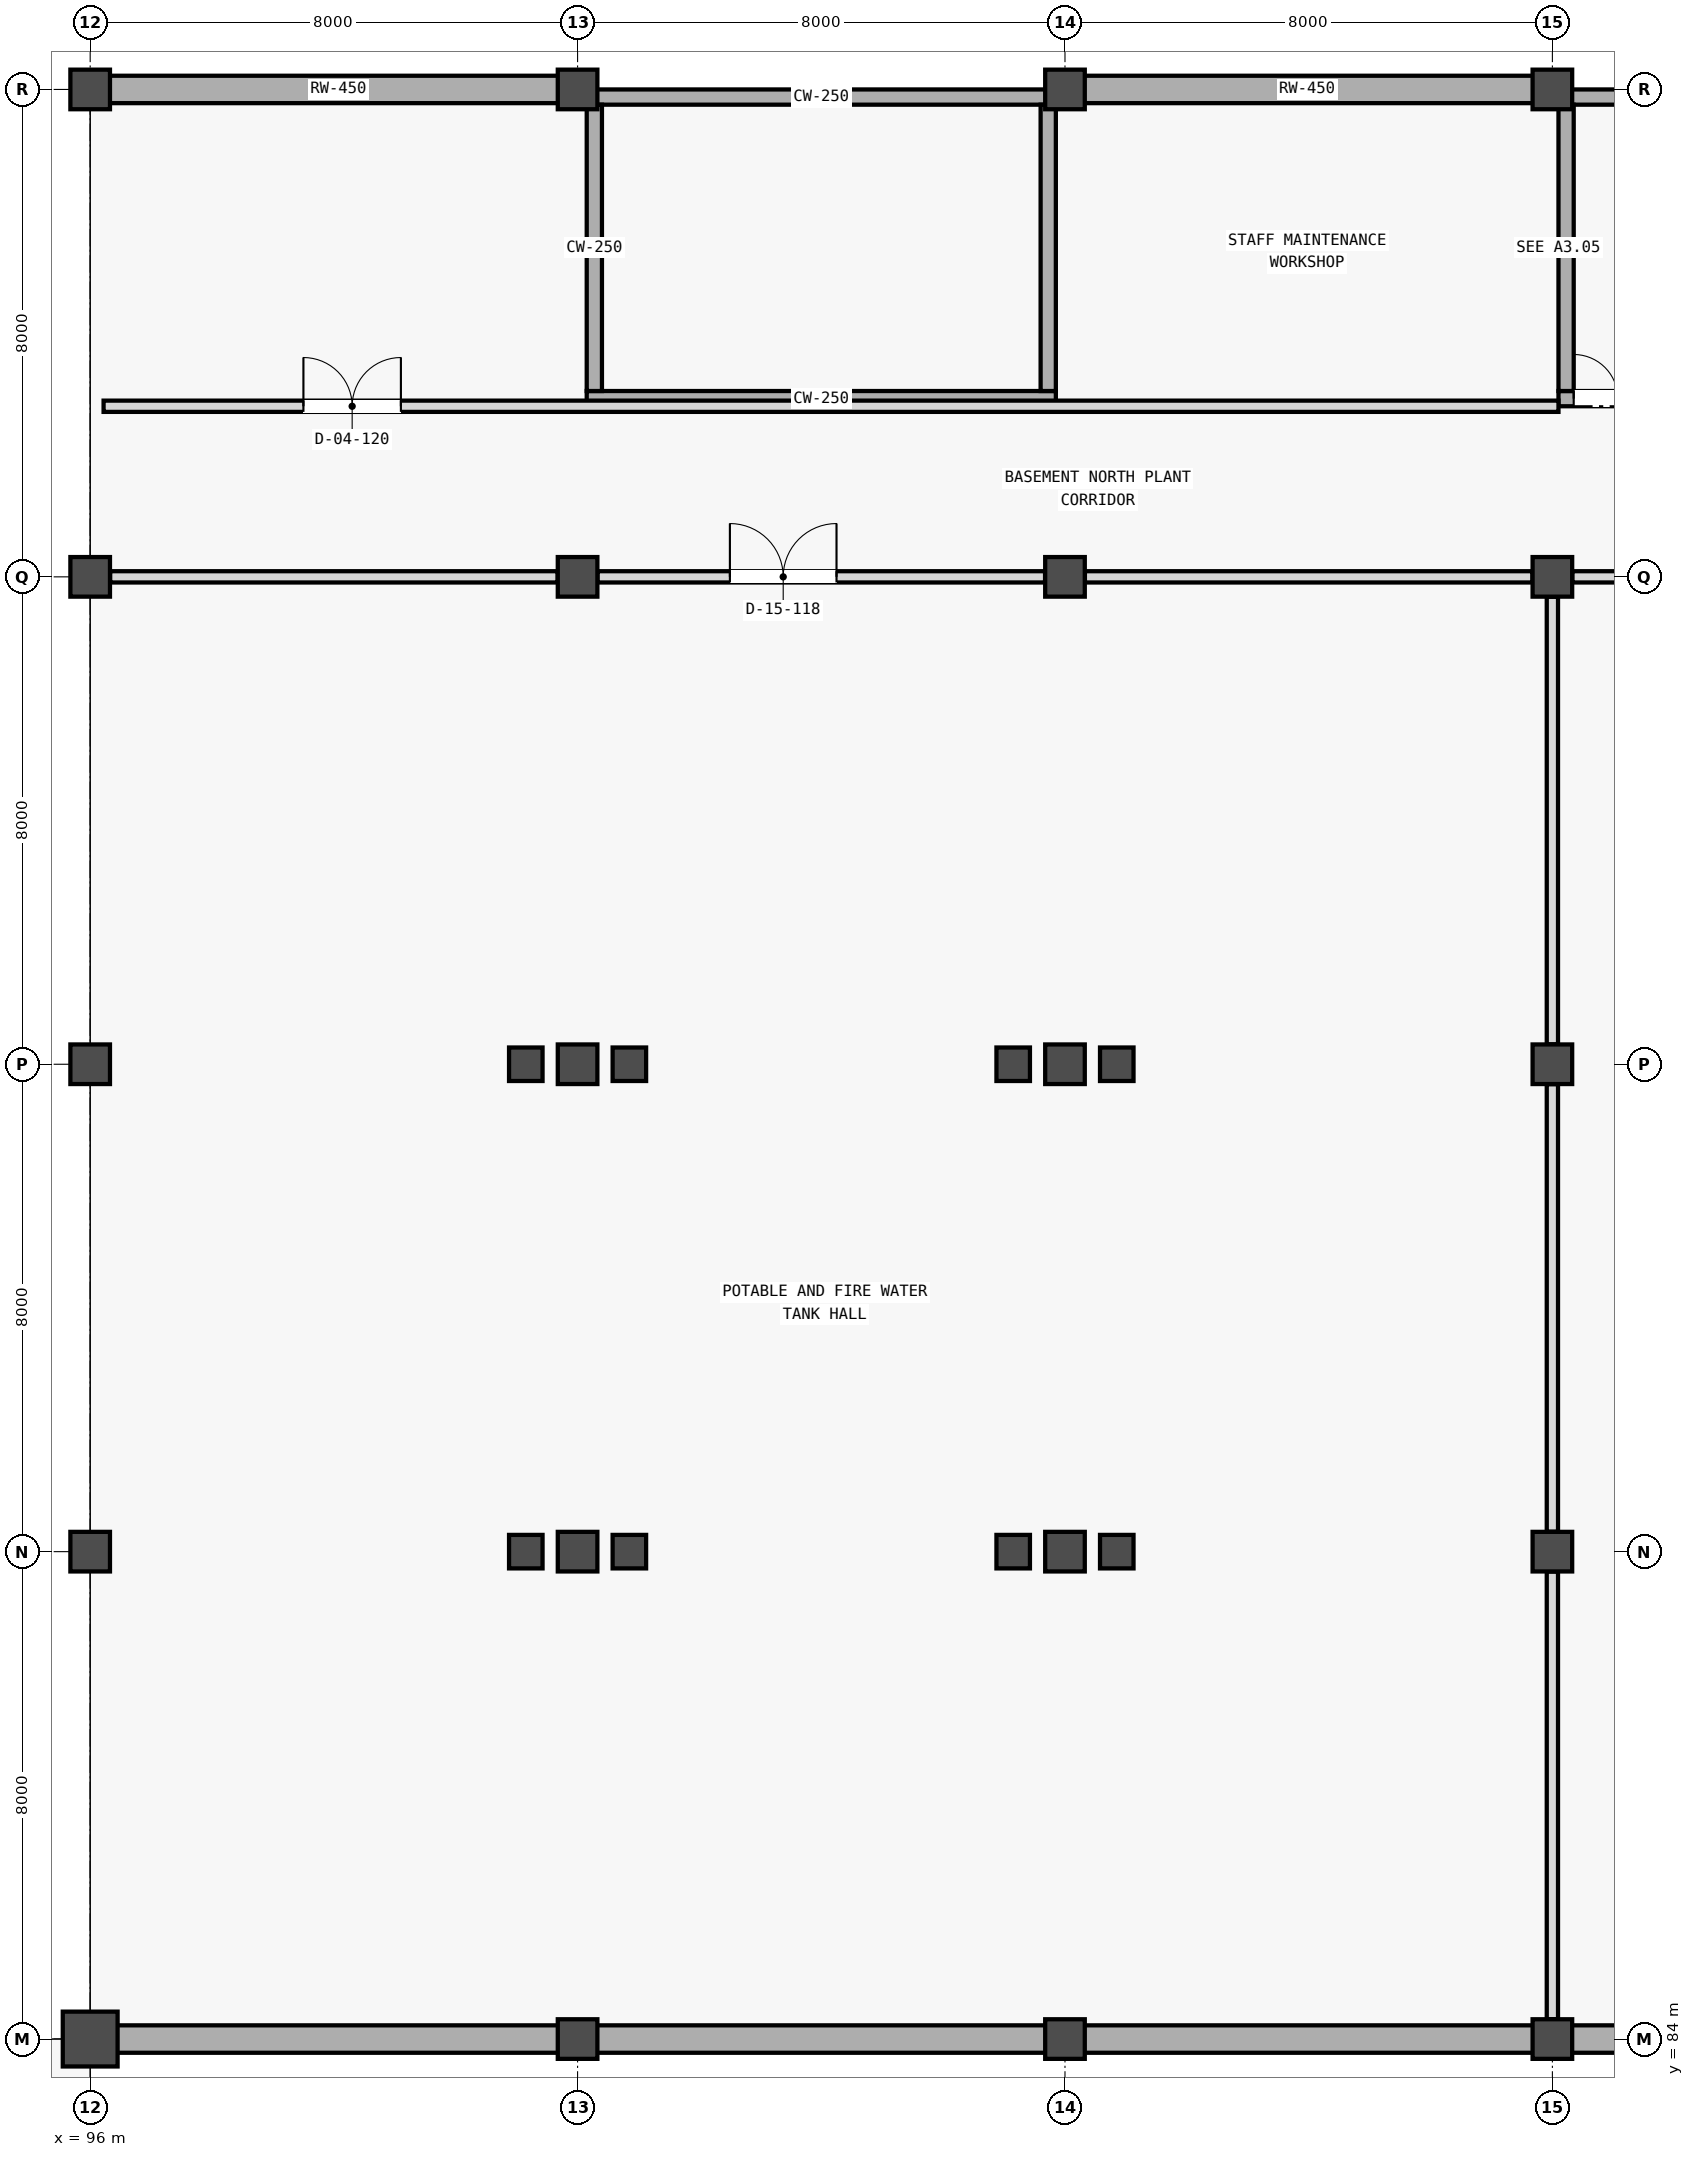
"""IFC4 building model, lengths in metres.
Left out: names, types, materials, properties, quantities, classifications, styles, units other than length and angle.
Written with IfcOpenShell. Run it as: python <this file> out.ifc"""

import sys

from ifc_helpers import new_model, si_unit, direction, frame, frame_2d, origin, origin_2d, place, context, subcontext, project, spatial, rectangle, extrude, element, fill, save


model = new_model("IFC4")
c1 = context("Model", 3, precision=1e-05, world=origin(), true_north=direction((0.0, 1.0)))
c2 = subcontext(c1, "Body", "Model", "MODEL_VIEW")
j1 = project(units=[si_unit("LENGTHUNIT", "METRE"), si_unit("PLANEANGLEUNIT", "RADIAN")], contexts=[c1])
p1 = place(None, origin())
s1 = spatial("IfcSite", under=j1, at=p1, CompositionType="ELEMENT")
p2 = place(p1, origin())
s2 = spatial("IfcBuilding", under=s1, at=p2, CompositionType="ELEMENT")
p3 = place(p2, frame((0.0, 0.0, -4.8)))
s3 = spatial("IfcBuildingStorey", under=s2, at=p3, CompositionType="ELEMENT", Elevation=-4.8)
p4 = place(p3, frame((96.0, 84.0, 0.0), z_axis=(0.0, 0.0, 1.0), x_axis=(1.0, 0.0, 0.0)))
e1 = element("IfcColumn", 1, at=p4, inside=s3, PredefinedType="COLUMN", context=c2, shape_type="SweptSolid", body=[
    extrude(rectangle(XDim=0.9, YDim=0.9, at=origin_2d()), origin(), (0.0, 0.0, 1.0), 4.47),
])
for number, where, z_axis, x_axis in (
    (2, (96.0, 92.0, 0.0), (0.0, 0.0, 1.0), (1.0, 0.0, 0.0)),
    (3, (96.0, 100.0, 0.0), (0.0, 0.0, 1.0), (1.0, 0.0, 0.0)),
    (4, (96.0, 108.0, 0.0), (0.0, 0.0, 1.0), (1.0, 0.0, 0.0)),
    (5, (96.0, 116.0, 0.0), (0.0, 0.0, 1.0), (1.0, 0.0, 0.0)),
    (6, (104.0, 84.0, 0.0), (0.0, 0.0, 1.0), (1.0, 0.0, 0.0)),
    (7, (104.0, 92.0, 0.0), (0.0, 0.0, 1.0), (1.0, 0.0, 0.0)),
    (8, (104.0, 100.0, 0.0), (0.0, 0.0, 1.0), (1.0, 0.0, 0.0)),
    (9, (104.0, 108.0, 0.0), (0.0, 0.0, 1.0), (1.0, 0.0, 0.0)),
    (10, (104.0, 116.0, 0.0), (0.0, 0.0, 1.0), (1.0, 0.0, 0.0)),
    (11, (112.0, 84.0, 0.0), (0.0, 0.0, 1.0), (1.0, 0.0, 0.0)),
    (12, (112.0, 92.0, 0.0), (0.0, 0.0, 1.0), (1.0, 0.0, 0.0)),
    (13, (112.0, 100.0, 0.0), (0.0, 0.0, 1.0), (1.0, 0.0, 0.0)),
    (14, (112.0, 108.0, 0.0), (0.0, 0.0, 1.0), (1.0, 0.0, 0.0)),
    (15, (112.0, 116.0, 0.0), (0.0, 0.0, 1.0), (1.0, 0.0, 0.0)),
    (16, (120.0, 84.0, 0.0), (0.0, 0.0, 1.0), (1.0, 0.0, 0.0)),
    (17, (120.0, 92.0, 0.0), (0.0, 0.0, 1.0), (1.0, 0.0, 0.0)),
    (18, (120.0, 100.0, 0.0), (0.0, 0.0, 1.0), (1.0, 0.0, 0.0)),
    (19, (120.0, 108.0, 0.0), (0.0, 0.0, 1.0), (1.0, 0.0, 0.0)),
    (20, (120.0, 116.0, 0.0), (0.0, 0.0, 1.0), (1.0, 0.0, 0.0)),
):
    element("IfcColumn", number, at=place(p3, frame(where, z_axis=z_axis, x_axis=x_axis)), inside=s3, PredefinedType="COLUMN", context=c2, shape_type="SweptSolid", body=[
        extrude(rectangle(XDim=0.65, YDim=0.65, at=origin_2d()), origin(), (0.0, 0.0, 1.0), 4.5),
    ])
p5 = place(p3, frame((96.0, 116.0, 0.0), z_axis=(0.0, 0.0, 1.0), x_axis=(1.0, 0.0, 0.0)))
e21 = element("IfcWall", 21, at=p5, inside=s3, PredefinedType="SOLIDWALL", context=c2, shape_type="SweptSolid", body=[
    extrude(rectangle(XDim=8.148, YDim=0.45, at=frame_2d((4.074, 0.0))), origin(), (0.0, 0.0, 1.0), 4.47),
])
p6 = place(p3, frame((111.852, 116.0, 0.0), z_axis=(0.0, 0.0, 1.0), x_axis=(1.0, 0.0, 0.0)))
e22 = element("IfcWall", 22, at=p6, inside=s3, PredefinedType="SOLIDWALL", context=c2, shape_type="SweptSolid", body=[
    extrude(rectangle(XDim=8.246, YDim=0.45, at=frame_2d((4.123, 0.0))), origin(), (0.0, 0.0, 1.0), 4.47),
])
p7 = place(p3, frame((96.0, 84.0, 0.0), z_axis=(0.0, 0.0, 1.0), x_axis=(1.0, 0.0, 0.0)))
e23 = element("IfcWall", 23, at=p7, inside=s3, PredefinedType="SOLIDWALL", context=c2, shape_type="SweptSolid", body=[
    extrude(rectangle(XDim=48.0, YDim=0.45, at=frame_2d((24.0, 0.0))), origin(), (0.0, 0.0, 1.0), 4.47),
])
for number, where, z_axis, x_axis in (
    (24, (103.15, 92.0, 0.0), (0.0, 0.0, 1.0), (1.0, 0.0, 0.0)),
    (25, (104.85, 92.0, 0.0), (0.0, 0.0, 1.0), (1.0, 0.0, 0.0)),
    (26, (111.15, 92.0, 0.0), (0.0, 0.0, 1.0), (1.0, 0.0, 0.0)),
    (27, (112.85, 92.0, 0.0), (0.0, 0.0, 1.0), (1.0, 0.0, 0.0)),
    (28, (103.15, 100.0, 0.0), (0.0, 0.0, 1.0), (1.0, 0.0, 0.0)),
    (29, (104.85, 100.0, 0.0), (0.0, 0.0, 1.0), (1.0, 0.0, 0.0)),
    (30, (111.15, 100.0, 0.0), (0.0, 0.0, 1.0), (1.0, 0.0, 0.0)),
    (31, (112.85, 100.0, 0.0), (0.0, 0.0, 1.0), (1.0, 0.0, 0.0)),
):
    element("IfcColumn", number, at=place(p3, frame(where, z_axis=z_axis, x_axis=x_axis)), inside=s3, PredefinedType="COLUMN", context=c2, shape_type="SweptSolid", body=[
        extrude(rectangle(XDim=0.55, YDim=0.55, at=origin_2d()), origin(), (0.0, 0.0, 1.0), 4.5),
    ])
p8 = place(p3, frame((120.1, 110.925, 0.0), z_axis=(0.0, 0.0, 1.0), x_axis=(1.0, 0.0, 0.0)))
e32 = element("IfcWall", 32, at=p8, inside=s3, PredefinedType="SHEAR", context=c2, shape_type="SweptSolid", body=[
    extrude(rectangle(XDim=7.8, YDim=0.25, at=frame_2d((3.9, 0.0))), origin(), (0.0, 0.0, 1.0), 4.8),
])
p9 = place(p8, frame((0.25, 0.0, 0.0)))
e33 = element("IfcOpeningElement", 33, at=p9, cuts=e32, PredefinedType="OPENING", context=c2, shape_type="SweptSolid", body=[
    extrude(rectangle(XDim=1.45, YDim=2.2, at=frame_2d((0.725, 1.1))), frame((0.0, 0.135, 0.0), z_axis=(0.0, -1.0, 0.0), x_axis=(1.0, 0.0, 0.0)), (0.0, 0.0, 1.0), 0.27),
])
p10 = place(p3, frame((120.1, 115.875, 0.0), z_axis=(0.0, 0.0, 1.0), x_axis=(1.0, 0.0, 0.0)))
e34 = element("IfcWall", 34, at=p10, inside=s3, PredefinedType="SHEAR", context=c2, shape_type="SweptSolid", body=[
    extrude(rectangle(XDim=7.8, YDim=0.25, at=frame_2d((3.9, 0.0))), origin(), (0.0, 0.0, 1.0), 4.8),
])
p11 = place(p3, frame((120.225, 111.05, 0.0), z_axis=(0.0, 0.0, 1.0), x_axis=(0.0, 1.0, 0.0)))
e35 = element("IfcWall", 35, at=p11, inside=s3, PredefinedType="SHEAR", context=c2, shape_type="SweptSolid", body=[
    extrude(rectangle(XDim=4.7, YDim=0.25, at=frame_2d((2.35, 0.0))), origin(), (0.0, 0.0, 1.0), 4.8),
])
for number, where, z_axis, x_axis in (
    (36, (104.15, 110.925, 0.0), (0.0, 0.0, 1.0), (1.0, 0.0, 0.0)),
    (37, (104.15, 115.875, 0.0), (0.0, 0.0, 1.0), (1.0, 0.0, 0.0)),
):
    element("IfcWall", number, at=place(p3, frame(where, z_axis=z_axis, x_axis=x_axis)), inside=s3, PredefinedType="SHEAR", context=c2, shape_type="SweptSolid", body=[
        extrude(rectangle(XDim=7.7, YDim=0.25, at=frame_2d((3.85, 0.0))), origin(), (0.0, 0.0, 1.0), 4.5),
    ])
for number, where, z_axis, x_axis in (
    (38, (104.275, 111.05, 0.0), (0.0, 0.0, 1.0), (0.0, 1.0, 0.0)),
    (39, (111.725, 111.05, 0.0), (0.0, 0.0, 1.0), (0.0, 1.0, 0.0)),
):
    element("IfcWall", number, at=place(p3, frame(where, z_axis=z_axis, x_axis=x_axis)), inside=s3, PredefinedType="SHEAR", context=c2, shape_type="SweptSolid", body=[
        extrude(rectangle(XDim=4.7, YDim=0.25, at=frame_2d((2.35, 0.0))), origin(), (0.0, 0.0, 1.0), 4.5),
    ])
p12 = place(p3, frame((96.327, 108.0, 0.0), z_axis=(0.0, 0.0, 1.0), x_axis=(1.0, 0.0, 0.0)))
e40 = element("IfcWall", 40, at=p12, inside=s3, PredefinedType="STANDARD", context=c2, shape_type="SweptSolid", body=[
    extrude(rectangle(XDim=7.346, YDim=0.185, at=frame_2d((3.673, 0.0))), origin(), (0.0, 0.0, 1.0), 3.7),
])
p13 = place(p3, frame((104.327, 108.0, 0.0), z_axis=(0.0, 0.0, 1.0), x_axis=(1.0, 0.0, 0.0)))
e41 = element("IfcWall", 41, at=p13, inside=s3, PredefinedType="STANDARD", context=c2, shape_type="SweptSolid", body=[
    extrude(rectangle(XDim=7.346, YDim=0.185, at=frame_2d((3.673, 0.0))), origin(), (0.0, 0.0, 1.0), 3.7),
])
p14 = place(p13, frame((2.173, 0.0, 0.0)))
e42 = element("IfcOpeningElement", 42, at=p14, cuts=e41, PredefinedType="OPENING", context=c2, shape_type="SweptSolid", body=[
    extrude(rectangle(XDim=1.75, YDim=2.35, at=frame_2d((0.875, 1.175))), frame((0.0, 0.103, 0.0), z_axis=(0.0, -1.0, 0.0), x_axis=(1.0, 0.0, 0.0)), (0.0, 0.0, 1.0), 0.205),
])
for number, where, z_axis, x_axis in (
    (43, (112.327, 108.0, 0.0), (0.0, 0.0, 1.0), (1.0, 0.0, 0.0)),
    (44, (120.327, 108.0, 0.0), (0.0, 0.0, 1.0), (1.0, 0.0, 0.0)),
):
    element("IfcWall", number, at=place(p3, frame(where, z_axis=z_axis, x_axis=x_axis)), inside=s3, PredefinedType="STANDARD", context=c2, shape_type="SweptSolid", body=[
        extrude(rectangle(XDim=7.346, YDim=0.185, at=frame_2d((3.673, 0.0))), origin(), (0.0, 0.0, 1.0), 3.7),
    ])
p15 = place(p3, frame((96.22, 110.8, 0.0), z_axis=(0.0, 0.0, 1.0), x_axis=(1.0, 0.0, 0.0)))
e45 = element("IfcWall", 45, at=p15, inside=s3, PredefinedType="STANDARD", context=c2, shape_type="SweptSolid", body=[
    extrude(rectangle(XDim=23.88, YDim=0.185, at=frame_2d((11.94, 0.0))), origin(), (0.0, 0.0, 1.0), 3.75),
])
p16 = place(p15, frame((3.28, 0.0, 0.0)))
e46 = element("IfcOpeningElement", 46, at=p16, cuts=e45, PredefinedType="OPENING", context=c2, shape_type="SweptSolid", body=[
    extrude(rectangle(XDim=1.6, YDim=2.3, at=frame_2d((0.8, 1.15))), frame((0.0, 0.103, 0.0), z_axis=(0.0, -1.0, 0.0), x_axis=(1.0, 0.0, 0.0)), (0.0, 0.0, 1.0), 0.205),
])
for number, where, z_axis, x_axis in (
    (47, (120.0, 84.327, 0.0), (0.0, 0.0, 1.0), (0.0, 1.0, 0.0)),
    (48, (120.0, 92.327, 0.0), (0.0, 0.0, 1.0), (0.0, 1.0, 0.0)),
    (49, (120.0, 100.327, 0.0), (0.0, 0.0, 1.0), (0.0, 1.0, 0.0)),
):
    element("IfcWall", number, at=place(p3, frame(where, z_axis=z_axis, x_axis=x_axis)), inside=s3, PredefinedType="STANDARD", context=c2, shape_type="SweptSolid", body=[
        extrude(rectangle(XDim=7.346, YDim=0.185, at=frame_2d((3.673, 0.0))), origin(), (0.0, 0.0, 1.0), 3.75),
    ])
p17 = place(p9, origin())
e50 = element("IfcDoor", 50, at=p17, inside=s3, OperationType="DOUBLE_DOOR_SINGLE_SWING", PredefinedType="DOOR", context=c2, shape_type="SweptSolid", body=[
    extrude(rectangle(XDim=1.45, YDim=2.2, at=frame_2d((0.725, 1.1))), frame((0.0, 0.025, 0.0), z_axis=(0.0, -1.0, 0.0), x_axis=(1.0, 0.0, 0.0)), (0.0, 0.0, 1.0), 0.05),
])
fill(e33, e50)
p18 = place(p14, origin())
e51 = element("IfcDoor", 51, at=p18, inside=s3, OperationType="DOUBLE_DOOR_SINGLE_SWING", PredefinedType="DOOR", context=c2, shape_type="SweptSolid", body=[
    extrude(rectangle(XDim=1.75, YDim=2.35, at=frame_2d((0.875, 1.175))), frame((0.0, 0.025, 0.0), z_axis=(0.0, -1.0, 0.0), x_axis=(1.0, 0.0, 0.0)), (0.0, 0.0, 1.0), 0.05),
])
fill(e42, e51)
p19 = place(p16, origin())
e52 = element("IfcDoor", 52, at=p19, inside=s3, OperationType="DOUBLE_DOOR_SINGLE_SWING", PredefinedType="DOOR", context=c2, shape_type="SweptSolid", body=[
    extrude(rectangle(XDim=1.6, YDim=2.3, at=frame_2d((0.8, 1.15))), frame((0.0, 0.025, 0.0), z_axis=(0.0, -1.0, 0.0), x_axis=(1.0, 0.0, 0.0)), (0.0, 0.0, 1.0), 0.05),
])
fill(e46, e52)
save(model, sys.argv[1])
